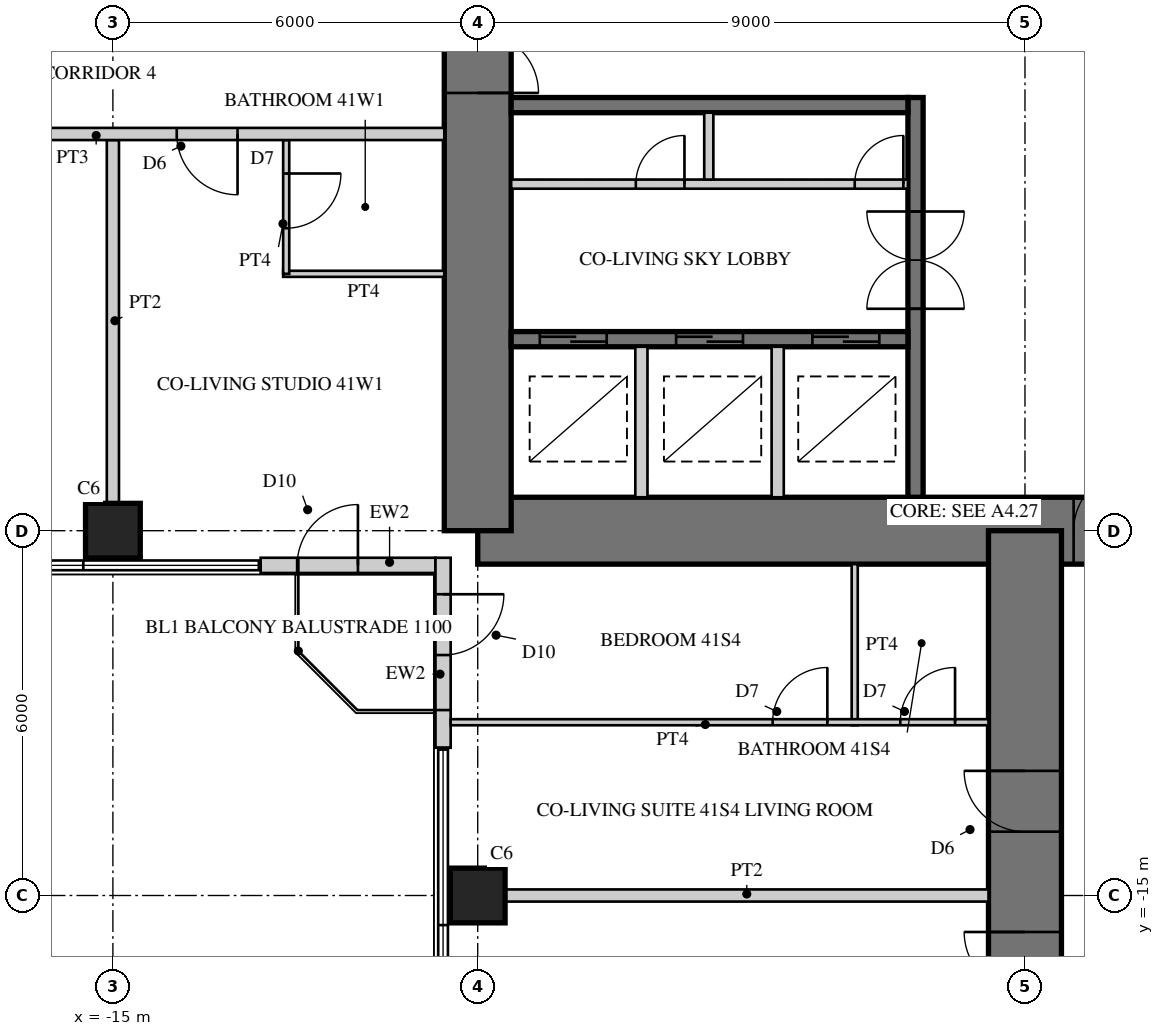
"""IFC4 building model, lengths in metres.
Left out: names, types, materials, properties, quantities, classifications, styles, units other than length and angle.
Written with IfcOpenShell. Run it as: python <this file> out.ifc"""

import sys

from ifc_helpers import new_model, si_unit, direction, frame, frame_2d, origin, origin_2d, place, context, subcontext, project, spatial, rectangle, hollow_rectangle, extrude, element, fill, save


model = new_model("IFC4")
c1 = context("Model", 3, precision=1e-05, world=origin(), true_north=direction((0.0, 1.0)))
c2 = subcontext(c1, "Body", "Model", "MODEL_VIEW")
j1 = project(units=[si_unit("LENGTHUNIT", "METRE"), si_unit("PLANEANGLEUNIT", "RADIAN")], contexts=[c1])
p1 = place(None, origin())
s1 = spatial("IfcSite", under=j1, at=p1, CompositionType="ELEMENT")
p2 = place(p1, origin())
s2 = spatial("IfcBuilding", under=s1, at=p2, CompositionType="ELEMENT")
p3 = place(p2, frame((0.0, 0.0, 169.5)))
s3 = spatial("IfcBuildingStorey", under=s2, at=p3, CompositionType="ELEMENT", Elevation=169.5)
p4 = place(p3, frame((-9.0, -9.0, 0.0), z_axis=(0.0, 0.0, 1.0), x_axis=(1.0, 0.0, 0.0)))
e1 = element("IfcWall", 1, at=p4, inside=s3, PredefinedType="SHEAR", context=c2, shape_type="SweptSolid", body=[
    extrude(rectangle(XDim=18.0, YDim=1.1, at=frame_2d((9.0, 0.0))), origin(), (0.0, 0.0, 1.0), 3.4),
])
p5 = place(p4, frame((9.8, 0.0, 0.0)))
e2 = element("IfcOpeningElement", 2, at=p5, cuts=e1, PredefinedType="OPENING", context=c2, shape_type="SweptSolid", body=[
    extrude(rectangle(XDim=1.0, YDim=2.4, at=frame_2d((0.5, 1.2))), frame((0.0, 0.56, 0.0), z_axis=(0.0, -1.0, 0.0), x_axis=(1.0, 0.0, 0.0)), (0.0, 0.0, 1.0), 1.12),
])
p6 = place(p3, frame((-9.0, 9.0, 0.0), z_axis=(0.0, 0.0, 1.0), x_axis=(0.0, -1.0, 0.0)))
e3 = element("IfcWall", 3, at=p6, inside=s3, PredefinedType="SHEAR", context=c2, shape_type="SweptSolid", body=[
    extrude(rectangle(XDim=18.0, YDim=1.1, at=frame_2d((9.0, 0.0))), origin(), (0.0, 0.0, 1.0), 3.4),
])
p7 = place(p6, frame((9.8, 0.0, 0.0)))
e4 = element("IfcOpeningElement", 4, at=p7, cuts=e3, PredefinedType="OPENING", context=c2, shape_type="SweptSolid", body=[
    extrude(rectangle(XDim=1.0, YDim=2.4, at=frame_2d((0.5, 1.2))), frame((0.0, 0.56, 0.0), z_axis=(0.0, -1.0, 0.0), x_axis=(1.0, 0.0, 0.0)), (0.0, 0.0, 1.0), 1.12),
])
p8 = place(p3, frame((-1.8, -1.875, 0.0), z_axis=(0.0, 0.0, 1.0), x_axis=(0.0, -1.0, 0.0)))
e5 = element("IfcWall", 5, at=p8, inside=s3, PredefinedType="SHEAR", context=c2, shape_type="SweptSolid", body=[
    extrude(rectangle(XDim=6.575, YDim=0.25, at=frame_2d((3.288, 0.0))), origin(), (0.0, 0.0, 1.0), 3.4),
])
p9 = place(p8, frame((1.875, 0.0, 0.0)))
e6 = element("IfcOpeningElement", 6, at=p9, cuts=e5, PredefinedType="OPENING", context=c2, shape_type="SweptSolid", body=[
    extrude(rectangle(XDim=1.6, YDim=2.4, at=frame_2d((0.8, 1.2))), frame((0.0, 0.135, 0.0), z_axis=(0.0, -1.0, 0.0), x_axis=(1.0, 0.0, 0.0)), (0.0, 0.0, 1.0), 0.27),
])
p10 = place(p3, frame((-1.925, -2.0, 0.0), z_axis=(0.0, 0.0, 1.0), x_axis=(-1.0, 0.0, 0.0)))
e7 = element("IfcWall", 7, at=p10, inside=s3, PredefinedType="SHEAR", context=c2, shape_type="SweptSolid", body=[
    extrude(rectangle(XDim=6.525, YDim=0.25, at=frame_2d((3.262, 0.0))), origin(), (0.0, 0.0, 1.0), 3.4),
])
p11 = place(p3, frame((-1.925, -5.85, 0.0), z_axis=(0.0, 0.0, 1.0), x_axis=(-1.0, 0.0, 0.0)))
e8 = element("IfcWall", 8, at=p11, inside=s3, PredefinedType="SHEAR", context=c2, shape_type="SweptSolid", body=[
    extrude(rectangle(XDim=6.525, YDim=0.25, at=frame_2d((3.262, 0.0))), origin(), (0.0, 0.0, 1.0), 3.4),
])
p12 = place(p11, frame((0.471, 0.0, 0.0)))
e9 = element("IfcOpeningElement", 9, at=p12, cuts=e8, PredefinedType="OPENING", context=c2, shape_type="SweptSolid", body=[
    extrude(rectangle(XDim=1.1, YDim=2.2, at=frame_2d((0.55, 1.1))), frame((0.0, 0.135, 0.0), z_axis=(0.0, -1.0, 0.0), x_axis=(1.0, 0.0, 0.0)), (0.0, 0.0, 1.0), 0.27),
])
p13 = place(p11, frame((2.712, 0.0, 0.0)))
e10 = element("IfcOpeningElement", 10, at=p13, cuts=e8, PredefinedType="OPENING", context=c2, shape_type="SweptSolid", body=[
    extrude(rectangle(XDim=1.1, YDim=2.2, at=frame_2d((0.55, 1.1))), frame((0.0, 0.135, 0.0), z_axis=(0.0, -1.0, 0.0), x_axis=(1.0, 0.0, 0.0)), (0.0, 0.0, 1.0), 0.27),
])
p14 = place(p11, frame((4.954, 0.0, 0.0)))
e11 = element("IfcOpeningElement", 11, at=p14, cuts=e8, PredefinedType="OPENING", context=c2, shape_type="SweptSolid", body=[
    extrude(rectangle(XDim=1.1, YDim=2.2, at=frame_2d((0.55, 1.1))), frame((0.0, 0.135, 0.0), z_axis=(0.0, -1.0, 0.0), x_axis=(1.0, 0.0, 0.0)), (0.0, 0.0, 1.0), 0.27),
])
p15 = place(p3, frame((-1.925, -3.3, 0.0), z_axis=(0.0, 0.0, 1.0), x_axis=(-1.0, 0.0, 0.0)))
e12 = element("IfcWall", 12, at=p15, inside=s3, PredefinedType="PARTITIONING", context=c2, shape_type="SweptSolid", body=[
    extrude(rectangle(XDim=6.525, YDim=0.15, at=frame_2d((3.262, 0.0))), origin(), (0.0, 0.0, 1.0), 3.4),
])
p16 = place(p15, frame((0.075, 0.0, 0.0)))
e13 = element("IfcOpeningElement", 13, at=p16, cuts=e12, PredefinedType="OPENING", context=c2, shape_type="SweptSolid", body=[
    extrude(rectangle(XDim=0.8, YDim=2.1, at=frame_2d((0.4, 1.05))), frame((0.0, 0.085, 0.0), z_axis=(0.0, -1.0, 0.0), x_axis=(1.0, 0.0, 0.0)), (0.0, 0.0, 1.0), 0.17),
])
p17 = place(p15, frame((3.675, 0.0, 0.0)))
e14 = element("IfcOpeningElement", 14, at=p17, cuts=e12, PredefinedType="OPENING", context=c2, shape_type="SweptSolid", body=[
    extrude(rectangle(XDim=0.8, YDim=2.1, at=frame_2d((0.4, 1.05))), frame((0.0, 0.085, 0.0), z_axis=(0.0, -1.0, 0.0), x_axis=(1.0, 0.0, 0.0)), (0.0, 0.0, 1.0), 0.17),
])
p18 = place(p3, frame((-5.2, -2.125, 0.0), z_axis=(0.0, 0.0, 1.0), x_axis=(0.0, -1.0, 0.0)))
e15 = element("IfcWall", 15, at=p18, inside=s3, PredefinedType="PARTITIONING", context=c2, shape_type="SweptSolid", body=[
    extrude(rectangle(XDim=1.1, YDim=0.15, at=frame_2d((0.55, 0.0))), origin(), (0.0, 0.0, 1.0), 3.4),
])
for number, where, z_axis, x_axis in (
    (16, (-4.067, -5.975, 0.0), (0.0, 0.0, 1.0), (0.0, -1.0, 0.0)),
    (17, (-6.308, -5.975, 0.0), (0.0, 0.0, 1.0), (0.0, -1.0, 0.0)),
):
    element("IfcWall", number, at=place(p3, frame(where, z_axis=z_axis, x_axis=x_axis)), inside=s3, PredefinedType="PARTITIONING", context=c2, shape_type="SweptSolid", body=[
        extrude(rectangle(XDim=2.475, YDim=0.2, at=frame_2d((1.237, 0.0))), origin(), (0.0, 0.0, 1.0), 3.4),
    ])
p19 = place(p3, frame((0.0, -9.0, 0.0), z_axis=(0.0, 0.0, 1.0), x_axis=(0.0, -1.0, 0.0)))
e18 = element("IfcWall", 18, at=p19, inside=s3, PredefinedType="SHEAR", context=c2, shape_type="SweptSolid", body=[
    extrude(rectangle(XDim=18.0, YDim=1.2, at=frame_2d((9.0, 0.0))), origin(), (0.0, 0.0, 1.0), 3.4),
])
p20 = place(p19, frame((3.95, 0.0, 0.0)))
e19 = element("IfcOpeningElement", 19, at=p20, cuts=e18, PredefinedType="OPENING", context=c2, shape_type="SweptSolid", body=[
    extrude(rectangle(XDim=1.0, YDim=2.15, at=frame_2d((0.5, 1.075))), frame((0.0, 0.61, 0.0), z_axis=(0.0, -1.0, 0.0), x_axis=(1.0, 0.0, 0.0)), (0.0, 0.0, 1.0), 1.22),
])
p21 = place(p19, frame((6.6, 0.0, 0.0)))
e20 = element("IfcOpeningElement", 20, at=p21, cuts=e18, PredefinedType="OPENING", context=c2, shape_type="SweptSolid", body=[
    extrude(rectangle(XDim=1.0, YDim=2.15, at=frame_2d((0.5, 1.075))), frame((0.0, 0.61, 0.0), z_axis=(0.0, -1.0, 0.0), x_axis=(1.0, 0.0, 0.0)), (0.0, 0.0, 1.0), 1.22),
])
p22 = place(p19, frame((13.25, 0.0, 0.0)))
e21 = element("IfcOpeningElement", 21, at=p22, cuts=e18, PredefinedType="OPENING", context=c2, shape_type="SweptSolid", body=[
    extrude(rectangle(XDim=1.0, YDim=2.2, at=frame_2d((0.5, 1.1))), frame((0.0, 0.61, 0.0), z_axis=(0.0, -1.0, 0.0), x_axis=(1.0, 0.0, 0.0)), (0.0, 0.0, 1.0), 1.22),
])
for number, where, z_axis, x_axis in (
    (22, (-9.0, -15.0, 0.0), (0.0, 0.0, 1.0), (1.0, 0.0, 0.0)),
    (23, (-15.0, -9.0, 0.0), (0.0, 0.0, 1.0), (1.0, 0.0, 0.0)),
):
    element("IfcColumn", number, at=place(p3, frame(where, z_axis=z_axis, x_axis=x_axis)), inside=s3, PredefinedType="COLUMN", context=c2, shape_type="SweptSolid", body=[
        extrude(rectangle(XDim=0.9, YDim=0.9, at=origin_2d()), origin(), (0.0, 0.0, 1.0), 3.4),
    ])
p23 = place(p3, frame((-12.57, -9.57, 0.0), z_axis=(0.0, 0.0, 1.0), x_axis=(1.0, 0.0, 0.0)))
e24 = element("IfcWall", 24, at=p23, inside=s3, PredefinedType="SOLIDWALL", context=c2, shape_type="SweptSolid", body=[
    extrude(rectangle(XDim=2.875, YDim=0.25, at=frame_2d((1.438, 0.0))), origin(), (0.0, 0.0, 1.0), 3.22),
])
p24 = place(p23, frame((0.6, 0.0, 0.0)))
e25 = element("IfcOpeningElement", 25, at=p24, cuts=e24, PredefinedType="OPENING", context=c2, shape_type="SweptSolid", body=[
    extrude(rectangle(XDim=1.0, YDim=2.2, at=frame_2d((0.5, 1.1))), frame((0.0, 0.135, 0.0), z_axis=(0.0, -1.0, 0.0), x_axis=(1.0, 0.0, 0.0)), (0.0, 0.0, 1.0), 0.27),
])
p25 = place(p3, frame((-9.57, -9.445, 0.0), z_axis=(0.0, 0.0, 1.0), x_axis=(0.0, -1.0, 0.0)))
e26 = element("IfcWall", 26, at=p25, inside=s3, PredefinedType="SOLIDWALL", context=c2, shape_type="SweptSolid", body=[
    extrude(rectangle(XDim=3.125, YDim=0.25, at=frame_2d((1.562, 0.0))), origin(), (0.0, 0.0, 1.0), 3.22),
])
p26 = place(p25, frame((0.6, 0.0, 0.0)))
e27 = element("IfcOpeningElement", 27, at=p26, cuts=e26, PredefinedType="OPENING", context=c2, shape_type="SweptSolid", body=[
    extrude(rectangle(XDim=1.0, YDim=2.2, at=frame_2d((0.5, 1.1))), frame((0.0, 0.135, 0.0), z_axis=(0.0, -1.0, 0.0), x_axis=(1.0, 0.0, 0.0)), (0.0, 0.0, 1.0), 0.27),
])
p27 = place(p3, frame((-2.8, -9.55, 0.0), z_axis=(0.0, 0.0, 1.0), x_axis=(0.0, -1.0, 0.0)))
e28 = element("IfcWall", 28, at=p27, inside=s3, PredefinedType="PARTITIONING", context=c2, shape_type="SweptSolid", body=[
    extrude(rectangle(XDim=2.65, YDim=0.1, at=frame_2d((1.325, 0.0))), origin(), (0.0, 0.0, 1.0), 3.22),
])
p28 = place(p3, frame((-9.445, -12.15, 0.0), z_axis=(0.0, 0.0, 1.0), x_axis=(1.0, 0.0, 0.0)))
e29 = element("IfcWall", 29, at=p28, inside=s3, PredefinedType="PARTITIONING", context=c2, shape_type="SweptSolid", body=[
    extrude(rectangle(XDim=8.845, YDim=0.1, at=frame_2d((4.422, 0.0))), origin(), (0.0, 0.0, 1.0), 3.22),
])
p29 = place(p28, frame((5.295, 0.0, 0.0)))
e30 = element("IfcOpeningElement", 30, at=p29, cuts=e29, PredefinedType="OPENING", context=c2, shape_type="SweptSolid", body=[
    extrude(rectangle(XDim=0.9, YDim=2.1, at=frame_2d((0.45, 1.05))), frame((0.0, 0.06, 0.0), z_axis=(0.0, -1.0, 0.0), x_axis=(1.0, 0.0, 0.0)), (0.0, 0.0, 1.0), 0.12),
])
p30 = place(p28, frame((7.395, 0.0, 0.0)))
e31 = element("IfcOpeningElement", 31, at=p30, cuts=e29, PredefinedType="OPENING", context=c2, shape_type="SweptSolid", body=[
    extrude(rectangle(XDim=0.9, YDim=2.1, at=frame_2d((0.45, 1.05))), frame((0.0, 0.06, 0.0), z_axis=(0.0, -1.0, 0.0), x_axis=(1.0, 0.0, 0.0)), (0.0, 0.0, 1.0), 0.12),
])
p31 = place(p3, frame((-8.55, -15.0, 0.0), z_axis=(0.0, 0.0, 1.0), x_axis=(1.0, 0.0, 0.0)))
e32 = element("IfcWall", 32, at=p31, inside=s3, PredefinedType="SOLIDWALL", context=c2, shape_type="SweptSolid", body=[
    extrude(rectangle(XDim=7.95, YDim=0.2, at=frame_2d((3.975, 0.0))), origin(), (0.0, 0.0, 1.0), 2.47),
])
p32 = place(p3, frame((-9.55, -4.775, 0.0), z_axis=(0.0, 0.0, 1.0), x_axis=(-1.0, 0.0, 0.0)))
e33 = element("IfcWall", 33, at=p32, inside=s3, PredefinedType="PARTITIONING", context=c2, shape_type="SweptSolid", body=[
    extrude(rectangle(XDim=2.65, YDim=0.1, at=frame_2d((1.325, 0.0))), origin(), (0.0, 0.0, 1.0), 3.22),
])
p33 = place(p3, frame((-12.15, -2.575, 0.0), z_axis=(0.0, 0.0, 1.0), x_axis=(0.0, -1.0, 0.0)))
e34 = element("IfcWall", 34, at=p33, inside=s3, PredefinedType="PARTITIONING", context=c2, shape_type="SweptSolid", body=[
    extrude(rectangle(XDim=2.2, YDim=0.1, at=frame_2d((1.1, 0.0))), origin(), (0.0, 0.0, 1.0), 3.22),
])
p34 = place(p33, frame((0.55, 0.0, 0.0)))
e35 = element("IfcOpeningElement", 35, at=p34, cuts=e34, PredefinedType="OPENING", context=c2, shape_type="SweptSolid", body=[
    extrude(rectangle(XDim=0.9, YDim=2.1, at=frame_2d((0.45, 1.05))), frame((0.0, 0.06, 0.0), z_axis=(0.0, -1.0, 0.0), x_axis=(1.0, 0.0, 0.0)), (0.0, 0.0, 1.0), 0.12),
])
p35 = place(p3, frame((-15.0, -2.575, 0.0), z_axis=(0.0, 0.0, 1.0), x_axis=(0.0, -1.0, 0.0)))
e36 = element("IfcWall", 36, at=p35, inside=s3, PredefinedType="SOLIDWALL", context=c2, shape_type="SweptSolid", body=[
    extrude(rectangle(XDim=5.975, YDim=0.2, at=frame_2d((2.988, 0.0))), origin(), (0.0, 0.0, 1.0), 2.47),
])
p36 = place(p3, frame((-9.55, -2.475, 0.0), z_axis=(0.0, 0.0, 1.0), x_axis=(-1.0, 0.0, 0.0)))
e37 = element("IfcWall", 37, at=p36, inside=s3, PredefinedType="SOLIDWALL", context=c2, shape_type="SweptSolid", body=[
    extrude(rectangle(XDim=11.45, YDim=0.2, at=frame_2d((5.725, 0.0))), origin(), (0.0, 0.0, 1.0), 3.22),
])
p37 = place(p36, frame((3.4, 0.0, 0.0)))
e38 = element("IfcOpeningElement", 38, at=p37, cuts=e37, PredefinedType="OPENING", context=c2, shape_type="SweptSolid", body=[
    extrude(rectangle(XDim=1.0, YDim=2.15, at=frame_2d((0.5, 1.075))), frame((0.0, 0.11, 0.0), z_axis=(0.0, -1.0, 0.0), x_axis=(1.0, 0.0, 0.0)), (0.0, 0.0, 1.0), 0.22),
])
p38 = place(p36, frame((6.65, 0.0, 0.0)))
e39 = element("IfcOpeningElement", 39, at=p38, cuts=e37, PredefinedType="OPENING", context=c2, shape_type="SweptSolid", body=[
    extrude(rectangle(XDim=1.0, YDim=2.2, at=frame_2d((0.5, 1.1))), frame((0.0, 0.11, 0.0), z_axis=(0.0, -1.0, 0.0), x_axis=(1.0, 0.0, 0.0)), (0.0, 0.0, 1.0), 0.22),
])
p39 = place(p24, origin())
e40 = element("IfcDoor", 40, at=p39, inside=s3, OperationType="SINGLE_SWING_RIGHT", PredefinedType="DOOR", context=c2, shape_type="SweptSolid", body=[
    extrude(hollow_rectangle(XDim=1.0, YDim=2.2, WallThickness=0.06, at=frame_2d((0.5, 1.1))), frame((0.0, 0.025, 0.0), z_axis=(0.0, -1.0, 0.0), x_axis=(1.0, 0.0, 0.0)), (0.0, 0.0, 1.0), 0.05),
    extrude(rectangle(XDim=0.879, YDim=2.079, at=frame_2d((0.5, 1.1))), frame((0.0, 0.025, 0.0), z_axis=(0.0, -1.0, 0.0), x_axis=(1.0, 0.0, 0.0)), (0.0, 0.0, 1.0), 0.05),
])
fill(e25, e40)
p40 = place(p26, origin())
e41 = element("IfcDoor", 41, at=p40, inside=s3, OperationType="SINGLE_SWING_LEFT", PredefinedType="DOOR", context=c2, shape_type="SweptSolid", body=[
    extrude(hollow_rectangle(XDim=1.0, YDim=2.2, WallThickness=0.06, at=frame_2d((0.5, 1.1))), frame((0.0, 0.025, 0.0), z_axis=(0.0, -1.0, 0.0), x_axis=(1.0, 0.0, 0.0)), (0.0, 0.0, 1.0), 0.05),
    extrude(rectangle(XDim=0.879, YDim=2.079, at=frame_2d((0.5, 1.1))), frame((0.0, 0.025, 0.0), z_axis=(0.0, -1.0, 0.0), x_axis=(1.0, 0.0, 0.0)), (0.0, 0.0, 1.0), 0.05),
])
fill(e27, e41)
p41 = place(p29, origin())
e42 = element("IfcDoor", 42, at=p41, inside=s3, OperationType="SINGLE_SWING_RIGHT", PredefinedType="DOOR", context=c2, shape_type="SweptSolid", body=[
    extrude(rectangle(XDim=0.9, YDim=2.1, at=frame_2d((0.45, 1.05))), frame((0.0, 0.025, 0.0), z_axis=(0.0, -1.0, 0.0), x_axis=(1.0, 0.0, 0.0)), (0.0, 0.0, 1.0), 0.05),
])
fill(e30, e42)
p42 = place(p30, origin())
e43 = element("IfcDoor", 43, at=p42, inside=s3, OperationType="SINGLE_SWING_RIGHT", PredefinedType="DOOR", context=c2, shape_type="SweptSolid", body=[
    extrude(rectangle(XDim=0.9, YDim=2.1, at=frame_2d((0.45, 1.05))), frame((0.0, 0.025, 0.0), z_axis=(0.0, -1.0, 0.0), x_axis=(1.0, 0.0, 0.0)), (0.0, 0.0, 1.0), 0.05),
])
fill(e31, e43)
p43 = place(p34, origin())
e44 = element("IfcDoor", 44, at=p43, inside=s3, OperationType="SINGLE_SWING_LEFT", PredefinedType="DOOR", context=c2, shape_type="SweptSolid", body=[
    extrude(rectangle(XDim=0.9, YDim=2.1, at=frame_2d((0.45, 1.05))), frame((0.0, 0.025, 0.0), z_axis=(0.0, -1.0, 0.0), x_axis=(1.0, 0.0, 0.0)), (0.0, 0.0, 1.0), 0.05),
])
fill(e35, e44)
p44 = place(p37, origin())
e45 = element("IfcDoor", 45, at=p44, inside=s3, OperationType="SINGLE_SWING_LEFT", PredefinedType="DOOR", context=c2, shape_type="SweptSolid", body=[
    extrude(rectangle(XDim=1.0, YDim=2.15, at=frame_2d((0.5, 1.075))), frame((0.0, 0.025, 0.0), z_axis=(0.0, -1.0, 0.0), x_axis=(1.0, 0.0, 0.0)), (0.0, 0.0, 1.0), 0.05),
])
fill(e38, e45)
p45 = place(p20, frame((1.0, 0.0, 0.0), z_axis=(0.0, 0.0, 1.0), x_axis=(-1.0, 0.0, 0.0)))
e46 = element("IfcDoor", 46, at=p45, inside=s3, OperationType="SINGLE_SWING_RIGHT", PredefinedType="DOOR", context=c2, shape_type="SweptSolid", body=[
    extrude(rectangle(XDim=1.0, YDim=2.15, at=frame_2d((0.5, 1.075))), frame((0.0, 0.025, 0.0), z_axis=(0.0, -1.0, 0.0), x_axis=(1.0, 0.0, 0.0)), (0.0, 0.0, 1.0), 0.05),
])
fill(e19, e46)
p46 = place(p21, frame((1.0, 0.0, 0.0), z_axis=(0.0, 0.0, 1.0), x_axis=(-1.0, 0.0, 0.0)))
e47 = element("IfcDoor", 47, at=p46, inside=s3, OperationType="SINGLE_SWING_RIGHT", PredefinedType="DOOR", context=c2, shape_type="SweptSolid", body=[
    extrude(rectangle(XDim=1.0, YDim=2.15, at=frame_2d((0.5, 1.075))), frame((0.0, 0.025, 0.0), z_axis=(0.0, -1.0, 0.0), x_axis=(1.0, 0.0, 0.0)), (0.0, 0.0, 1.0), 0.05),
])
fill(e20, e47)
p47 = place(p5, origin())
e48 = element("IfcDoor", 48, at=p47, inside=s3, OperationType="SINGLE_SWING_RIGHT", PredefinedType="DOOR", context=c2, shape_type="SweptSolid", body=[
    extrude(rectangle(XDim=1.0, YDim=2.4, at=frame_2d((0.5, 1.2))), frame((0.0, 0.055, 0.0), z_axis=(0.0, -1.0, 0.0), x_axis=(1.0, 0.0, 0.0)), (0.0, 0.0, 1.0), 0.05),
])
fill(e2, e48)
p48 = place(p7, origin())
e49 = element("IfcDoor", 49, at=p48, inside=s3, OperationType="SINGLE_SWING_RIGHT", PredefinedType="DOOR", context=c2, shape_type="SweptSolid", body=[
    extrude(rectangle(XDim=1.0, YDim=2.4, at=frame_2d((0.5, 1.2))), frame((0.0, 0.055, 0.0), z_axis=(0.0, -1.0, 0.0), x_axis=(1.0, 0.0, 0.0)), (0.0, 0.0, 1.0), 0.05),
])
fill(e4, e49)
p49 = place(p12, origin())
e50 = element("IfcDoor", 50, at=p49, inside=s3, OperationType="DOUBLE_DOOR_SLIDING", PredefinedType="DOOR", context=c2, shape_type="SweptSolid", body=[
    extrude(rectangle(XDim=1.1, YDim=2.2, at=frame_2d((0.55, 1.1))), frame((0.0, 0.025, 0.0), z_axis=(0.0, -1.0, 0.0), x_axis=(1.0, 0.0, 0.0)), (0.0, 0.0, 1.0), 0.05),
])
fill(e9, e50)
p50 = place(p13, origin())
e51 = element("IfcDoor", 51, at=p50, inside=s3, OperationType="DOUBLE_DOOR_SLIDING", PredefinedType="DOOR", context=c2, shape_type="SweptSolid", body=[
    extrude(rectangle(XDim=1.1, YDim=2.2, at=frame_2d((0.55, 1.1))), frame((0.0, 0.025, 0.0), z_axis=(0.0, -1.0, 0.0), x_axis=(1.0, 0.0, 0.0)), (0.0, 0.0, 1.0), 0.05),
])
fill(e10, e51)
p51 = place(p14, origin())
e52 = element("IfcDoor", 52, at=p51, inside=s3, OperationType="DOUBLE_DOOR_SLIDING", PredefinedType="DOOR", context=c2, shape_type="SweptSolid", body=[
    extrude(rectangle(XDim=1.1, YDim=2.2, at=frame_2d((0.55, 1.1))), frame((0.0, 0.025, 0.0), z_axis=(0.0, -1.0, 0.0), x_axis=(1.0, 0.0, 0.0)), (0.0, 0.0, 1.0), 0.05),
])
fill(e11, e52)
p52 = place(p9, origin())
e53 = element("IfcDoor", 53, at=p52, inside=s3, OperationType="DOUBLE_DOOR_DOUBLE_SWING", PredefinedType="DOOR", context=c2, shape_type="SweptSolid", body=[
    extrude(rectangle(XDim=1.6, YDim=2.4, at=frame_2d((0.8, 1.2))), frame((0.0, 0.025, 0.0), z_axis=(0.0, -1.0, 0.0), x_axis=(1.0, 0.0, 0.0)), (0.0, 0.0, 1.0), 0.05),
])
fill(e6, e53)
p53 = place(p16, frame((0.8, 0.0, 0.0), z_axis=(0.0, 0.0, 1.0), x_axis=(-1.0, 0.0, 0.0)))
e54 = element("IfcDoor", 54, at=p53, inside=s3, OperationType="SINGLE_SWING_RIGHT", PredefinedType="DOOR", context=c2, shape_type="SweptSolid", body=[
    extrude(rectangle(XDim=0.8, YDim=2.1, at=frame_2d((0.4, 1.05))), frame((0.0, 0.025, 0.0), z_axis=(0.0, -1.0, 0.0), x_axis=(1.0, 0.0, 0.0)), (0.0, 0.0, 1.0), 0.05),
])
fill(e13, e54)
p54 = place(p17, frame((0.8, 0.0, 0.0), z_axis=(0.0, 0.0, 1.0), x_axis=(-1.0, 0.0, 0.0)))
e55 = element("IfcDoor", 55, at=p54, inside=s3, OperationType="SINGLE_SWING_RIGHT", PredefinedType="DOOR", context=c2, shape_type="SweptSolid", body=[
    extrude(rectangle(XDim=0.8, YDim=2.1, at=frame_2d((0.4, 1.05))), frame((0.0, 0.025, 0.0), z_axis=(0.0, -1.0, 0.0), x_axis=(1.0, 0.0, 0.0)), (0.0, 0.0, 1.0), 0.05),
])
fill(e14, e55)
save(model, sys.argv[1])
